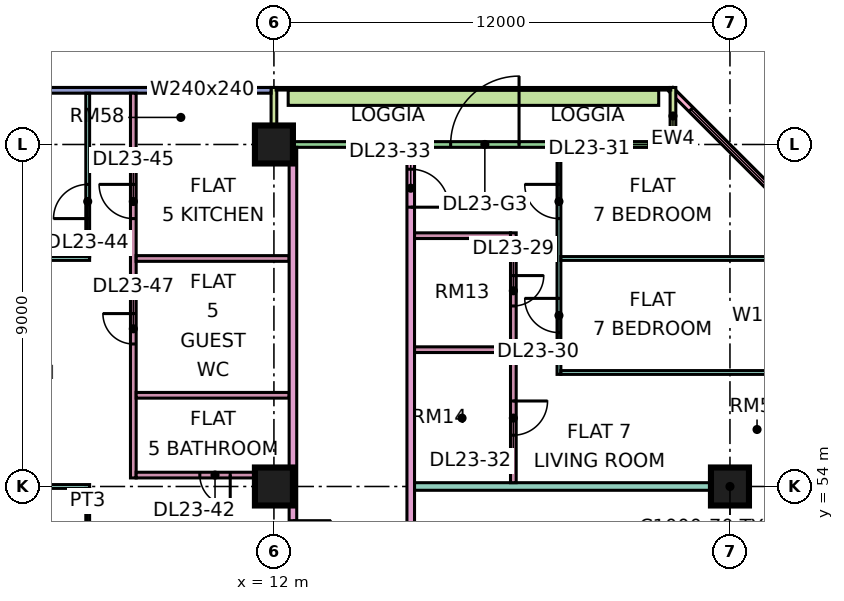
"""IFC4 building model, lengths in metres.
Left out: names, types, materials, properties, quantities, classifications, styles, units other than length and angle.
Written with IfcOpenShell. Run it as: python <this file> out.ifc"""

import sys

from ifc_helpers import new_model, si_unit, direction, frame, frame_2d, origin, origin_2d, place, context, subcontext, project, spatial, rectangle, extrude, element, fill, save


model = new_model("IFC4")
c1 = context("Model", 3, precision=1e-05, world=origin(), true_north=direction((0.0, 1.0)))
c2 = subcontext(c1, "Body", "Model", "MODEL_VIEW")
j1 = project(units=[si_unit("LENGTHUNIT", "METRE"), si_unit("PLANEANGLEUNIT", "RADIAN")], contexts=[c1])
p1 = place(None, origin())
s1 = spatial("IfcSite", under=j1, at=p1, CompositionType="ELEMENT")
p2 = place(p1, origin())
s2 = spatial("IfcBuilding", under=s1, at=p2, CompositionType="ELEMENT")
p3 = place(p2, frame((0.0, 0.0, 103.15)))
s3 = spatial("IfcBuildingStorey", under=s2, at=p3, CompositionType="ELEMENT", Elevation=103.15)
for number, where, z_axis, x_axis in (
    (1, (12.0, 54.0, 0.0), (0.0, 0.0, 1.0), (1.0, 0.0, 0.0)),
    (2, (12.0, 63.0, 0.0), (0.0, 0.0, 1.0), (1.0, 0.0, 0.0)),
    (3, (24.0, 54.0, 0.0), (0.0, 0.0, 1.0), (1.0, 0.0, 0.0)),
):
    element("IfcColumn", number, at=place(p3, frame(where, z_axis=z_axis, x_axis=x_axis)), inside=s3, PredefinedType="COLUMN", context=c2, shape_type="SweptSolid", body=[
        extrude(rectangle(XDim=1.0, YDim=1.0, at=origin_2d()), origin(), (0.0, 0.0, 1.0), 3.75),
    ])
p4 = place(p3, frame((25.447, 61.447, 0.0), z_axis=(0.0, 0.0, 1.0), x_axis=(-0.707106781187, 0.707106781187, 0.0)))
e4 = element("IfcWall", 4, at=p4, inside=s3, PredefinedType="SOLIDWALL", context=c2, shape_type="SweptSolid", body=[
    extrude(rectangle(XDim=4.243, YDim=0.15, at=frame_2d((2.121, 0.0))), origin(), (0.0, 0.0, 1.0), 3.35),
])
p5 = place(p4, frame((0.498, 0.0, 0.45)))
e5 = element("IfcOpeningElement", 5, at=p5, cuts=e4, PredefinedType="OPENING", context=c2, shape_type="SweptSolid", body=[
    extrude(rectangle(XDim=3.0, YDim=2.4, at=frame_2d((1.5, 1.2))), frame((0.0, 0.085, 0.0), z_axis=(0.0, -1.0, 0.0), x_axis=(1.0, 0.0, 0.0)), (0.0, 0.0, 1.0), 0.17),
])
p6 = place(p3, frame((22.425, 63.0, 0.0), z_axis=(0.0, 0.0, 1.0), x_axis=(-1.0, 0.0, 0.0)))
e6 = element("IfcWall", 6, at=p6, inside=s3, PredefinedType="SOLIDWALL", context=c2, shape_type="SweptSolid", body=[
    extrude(rectangle(XDim=10.35, YDim=0.15, at=frame_2d((5.175, 0.0))), origin(), (0.0, 0.0, 1.0), 3.35),
])
p7 = place(p6, frame((0.562, 0.0, 0.45)))
e7 = element("IfcOpeningElement", 7, at=p7, cuts=e6, PredefinedType="OPENING", context=c2, shape_type="SweptSolid", body=[
    extrude(rectangle(XDim=1.8, YDim=2.4, at=frame_2d((0.9, 1.2))), frame((0.0, 0.085, 0.0), z_axis=(0.0, -1.0, 0.0), x_axis=(1.0, 0.0, 0.0)), (0.0, 0.0, 1.0), 0.17),
])
p8 = place(p6, frame((3.975, 0.0, 0.0)))
e8 = element("IfcOpeningElement", 8, at=p8, cuts=e6, PredefinedType="OPENING", context=c2, shape_type="SweptSolid", body=[
    extrude(rectangle(XDim=1.8, YDim=2.4, at=frame_2d((0.9, 1.2))), frame((0.0, 0.085, 0.0), z_axis=(0.0, -1.0, 0.0), x_axis=(1.0, 0.0, 0.0)), (0.0, 0.0, 1.0), 0.17),
])
for number, where, z_axis, x_axis in (
    (9, (22.5, 64.5, 0.0), (0.0, 0.0, 1.0), (0.0, -1.0, 0.0)),
    (10, (12.0, 64.5, 0.0), (0.0, 0.0, 1.0), (0.0, -1.0, 0.0)),
):
    element("IfcWall", number, at=place(p3, frame(where, z_axis=z_axis, x_axis=x_axis)), inside=s3, PredefinedType="SOLIDWALL", context=c2, shape_type="SweptSolid", body=[
        extrude(rectangle(XDim=1.5, YDim=0.15, at=frame_2d((0.75, 0.0))), origin(), (0.0, 0.0, 1.0), 3.35),
    ])
p9 = place(p3, frame((11.925, 64.425, 0.0), z_axis=(0.0, 0.0, 1.0), x_axis=(-1.0, 0.0, 0.0)))
e11 = element("IfcWall", 11, at=p9, inside=s3, PredefinedType="SOLIDWALL", context=c2, shape_type="SweptSolid", body=[
    extrude(rectangle(XDim=10.425, YDim=0.15, at=frame_2d((5.212, 0.0))), origin(), (0.0, 0.0, 1.0), 3.35),
])
p10 = place(p9, frame((0.613, 0.0, 0.45)))
e12 = element("IfcOpeningElement", 12, at=p10, cuts=e11, PredefinedType="OPENING", context=c2, shape_type="SweptSolid", body=[
    extrude(rectangle(XDim=2.4, YDim=2.4, at=frame_2d((1.2, 1.2))), frame((0.0, 0.085, 0.0), z_axis=(0.0, -1.0, 0.0), x_axis=(1.0, 0.0, 0.0)), (0.0, 0.0, 1.0), 0.17),
])
p11 = place(p9, frame((6.125, 0.0, 0.45)))
e13 = element("IfcOpeningElement", 13, at=p11, cuts=e11, PredefinedType="OPENING", context=c2, shape_type="SweptSolid", body=[
    extrude(rectangle(XDim=3.0, YDim=2.4, at=frame_2d((1.5, 1.2))), frame((0.0, 0.085, 0.0), z_axis=(0.0, -1.0, 0.0), x_axis=(1.0, 0.0, 0.0)), (0.0, 0.0, 1.0), 0.17),
])
p12 = place(p3, frame((22.125, 64.229, 0.0), z_axis=(0.0, 0.0, 1.0), x_axis=(-1.0, 0.0, 0.0)))
e14 = element("IfcWall", 14, at=p12, inside=s3, PredefinedType="SOLIDWALL", context=c2, shape_type="SweptSolid", body=[
    extrude(rectangle(XDim=9.75, YDim=0.4, at=frame_2d((4.875, 0.0))), origin(), (0.0, 0.0, 1.0), 0.7),
])
p13 = place(p3, frame((0.0, 54.0, 0.0), z_axis=(0.0, 0.0, 1.0), x_axis=(1.0, 0.0, 0.0)))
e15 = element("IfcWall", 15, at=p13, inside=s3, PredefinedType="PARTITIONING", context=c2, shape_type="SweptSolid", body=[
    extrude(rectangle(XDim=7.15, YDim=0.1, at=frame_2d((3.575, 0.0))), origin(), (0.0, 0.0, 1.0), 3.35),
])
p14 = place(p3, frame((-1.35, 60.0, 0.0), z_axis=(0.0, 0.0, 1.0), x_axis=(1.0, 0.0, 0.0)))
e16 = element("IfcWall", 16, at=p14, inside=s3, PredefinedType="PARTITIONING", context=c2, shape_type="SweptSolid", body=[
    extrude(rectangle(XDim=8.5, YDim=0.1, at=frame_2d((4.25, 0.0))), origin(), (0.0, 0.0, 1.0), 3.35),
])
p15 = place(p3, frame((7.1, 51.1, 0.0), z_axis=(0.0, 0.0, 1.0), x_axis=(0.0, 1.0, 0.0)))
e17 = element("IfcWall", 17, at=p15, inside=s3, PredefinedType="PARTITIONING", context=c2, shape_type="SweptSolid", body=[
    extrude(rectangle(XDim=2.85, YDim=0.1, at=frame_2d((1.425, 0.0))), origin(), (0.0, 0.0, 1.0), 3.35),
])
p16 = place(p15, frame((0.95, 0.0, 0.0)))
e18 = element("IfcOpeningElement", 18, at=p16, cuts=e17, PredefinedType="OPENING", context=c2, shape_type="SweptSolid", body=[
    extrude(rectangle(XDim=0.9, YDim=2.1, at=frame_2d((0.45, 1.05))), frame((0.0, 0.06, 0.0), z_axis=(0.0, -1.0, 0.0), x_axis=(1.0, 0.0, 0.0)), (0.0, 0.0, 1.0), 0.12),
])
p17 = place(p3, frame((7.1, 60.05, 0.0), z_axis=(0.0, 0.0, 1.0), x_axis=(0.0, 1.0, 0.0)))
e19 = element("IfcWall", 19, at=p17, inside=s3, PredefinedType="PARTITIONING", context=c2, shape_type="SweptSolid", body=[
    extrude(rectangle(XDim=4.3, YDim=0.1, at=frame_2d((2.15, 0.0))), origin(), (0.0, 0.0, 1.0), 3.35),
])
p18 = place(p17, frame((1.0, 0.0, 0.0)))
e20 = element("IfcOpeningElement", 20, at=p18, cuts=e19, PredefinedType="OPENING", context=c2, shape_type="SweptSolid", body=[
    extrude(rectangle(XDim=0.9, YDim=2.1, at=frame_2d((0.45, 1.05))), frame((0.0, 0.06, 0.0), z_axis=(0.0, -1.0, 0.0), x_axis=(1.0, 0.0, 0.0)), (0.0, 0.0, 1.0), 0.12),
])
p19 = place(p3, frame((8.3, 54.225, 0.0), z_axis=(0.0, 0.0, 1.0), x_axis=(0.0, 1.0, 0.0)))
e21 = element("IfcWall", 21, at=p19, inside=s3, PredefinedType="PARTITIONING", context=c2, shape_type="SweptSolid", body=[
    extrude(rectangle(XDim=10.125, YDim=0.15, at=frame_2d((5.062, 0.0))), origin(), (0.0, 0.0, 1.0), 3.35),
])
p20 = place(p19, frame((6.825, 0.0, 0.0)))
e22 = element("IfcOpeningElement", 22, at=p20, cuts=e21, PredefinedType="OPENING", context=c2, shape_type="SweptSolid", body=[
    extrude(rectangle(XDim=0.9, YDim=2.1, at=frame_2d((0.45, 1.05))), frame((0.0, 0.085, 0.0), z_axis=(0.0, -1.0, 0.0), x_axis=(1.0, 0.0, 0.0)), (0.0, 0.0, 1.0), 0.17),
])
p21 = place(p19, frame((3.525, 0.0, 0.0)))
e23 = element("IfcOpeningElement", 23, at=p21, cuts=e21, PredefinedType="OPENING", context=c2, shape_type="SweptSolid", body=[
    extrude(rectangle(XDim=0.8, YDim=2.1, at=frame_2d((0.4, 1.05))), frame((0.0, 0.085, 0.0), z_axis=(0.0, -1.0, 0.0), x_axis=(1.0, 0.0, 0.0)), (0.0, 0.0, 1.0), 0.17),
])
p22 = place(p3, frame((8.375, 54.3, 0.0), z_axis=(0.0, 0.0, 1.0), x_axis=(1.0, 0.0, 0.0)))
e24 = element("IfcWall", 24, at=p22, inside=s3, PredefinedType="PARTITIONING", context=c2, shape_type="SweptSolid", body=[
    extrude(rectangle(XDim=4.025, YDim=0.15, at=frame_2d((2.012, 0.0))), origin(), (0.0, 0.0, 1.0), 3.35),
])
p23 = place(p22, frame((1.675, 0.0, 0.0)))
e25 = element("IfcOpeningElement", 25, at=p23, cuts=e24, PredefinedType="OPENING", context=c2, shape_type="SweptSolid", body=[
    extrude(rectangle(XDim=0.8, YDim=2.1, at=frame_2d((0.4, 1.05))), frame((0.0, 0.085, 0.0), z_axis=(0.0, -1.0, 0.0), x_axis=(1.0, 0.0, 0.0)), (0.0, 0.0, 1.0), 0.17),
])
for number, where, z_axis, x_axis in (
    (26, (8.375, 56.4, 0.0), (0.0, 0.0, 1.0), (1.0, 0.0, 0.0)),
    (27, (8.375, 60.0, 0.0), (0.0, 0.0, 1.0), (1.0, 0.0, 0.0)),
):
    element("IfcWall", number, at=place(p3, frame(where, z_axis=z_axis, x_axis=x_axis)), inside=s3, PredefinedType="PARTITIONING", context=c2, shape_type="SweptSolid", body=[
        extrude(rectangle(XDim=4.025, YDim=0.15, at=frame_2d((2.012, 0.0))), origin(), (0.0, 0.0, 1.0), 3.35),
    ])
p24 = place(p3, frame((12.5, 20.0, 0.0), z_axis=(0.0, 0.0, 1.0), x_axis=(0.0, 1.0, 0.0)))
e28 = element("IfcWall", 28, at=p24, inside=s3, PredefinedType="PARTITIONING", context=c2, shape_type="SweptSolid", body=[
    extrude(rectangle(XDim=42.926, YDim=0.2, at=frame_2d((21.463, 0.0))), origin(), (0.0, 0.0, 1.0), 3.35),
])
p25 = place(p24, frame((28.65, 0.0, 0.0)))
e29 = element("IfcOpeningElement", 29, at=p25, cuts=e28, PredefinedType="OPENING", context=c2, shape_type="SweptSolid", body=[
    extrude(rectangle(XDim=1.0, YDim=2.1, at=frame_2d((0.5, 1.05))), frame((0.0, 0.11, 0.0), z_axis=(0.0, -1.0, 0.0), x_axis=(1.0, 0.0, 0.0)), (0.0, 0.0, 1.0), 0.22),
])
p26 = place(p24, frame((32.1, 0.0, 0.0)))
e30 = element("IfcOpeningElement", 30, at=p26, cuts=e28, PredefinedType="OPENING", context=c2, shape_type="SweptSolid", body=[
    extrude(rectangle(XDim=1.0, YDim=2.1, at=frame_2d((0.5, 1.05))), frame((0.0, 0.11, 0.0), z_axis=(0.0, -1.0, 0.0), x_axis=(1.0, 0.0, 0.0)), (0.0, 0.0, 1.0), 0.22),
])
p27 = place(p24, frame((0.6, 0.0, 0.0)))
e31 = element("IfcOpeningElement", 31, at=p27, cuts=e28, PredefinedType="OPENING", context=c2, shape_type="SweptSolid", body=[
    extrude(rectangle(XDim=1.2, YDim=2.1, at=frame_2d((0.6, 1.05))), frame((0.0, 0.11, 0.0), z_axis=(0.0, -1.0, 0.0), x_axis=(1.0, 0.0, 0.0)), (0.0, 0.0, 1.0), 0.22),
])
p28 = place(p24, frame((13.95, 0.0, 0.0)))
e32 = element("IfcOpeningElement", 32, at=p28, cuts=e28, PredefinedType="OPENING", context=c2, shape_type="SweptSolid", body=[
    extrude(rectangle(XDim=1.0, YDim=2.1, at=frame_2d((0.5, 1.05))), frame((0.0, 0.11, 0.0), z_axis=(0.0, -1.0, 0.0), x_axis=(1.0, 0.0, 0.0)), (0.0, 0.0, 1.0), 0.22),
])
p29 = place(p3, frame((15.6, 51.225, 0.0), z_axis=(0.0, 0.0, 1.0), x_axis=(0.0, 1.0, 0.0)))
e33 = element("IfcWall", 33, at=p29, inside=s3, PredefinedType="PARTITIONING", context=c2, shape_type="SweptSolid", body=[
    extrude(rectangle(XDim=11.701, YDim=0.2, at=frame_2d((5.851, 0.0))), origin(), (0.0, 0.0, 1.0), 3.35),
])
p30 = place(p29, frame((10.125, 0.0, 0.0)))
e34 = element("IfcOpeningElement", 34, at=p30, cuts=e33, PredefinedType="OPENING", context=c2, shape_type="SweptSolid", body=[
    extrude(rectangle(XDim=1.0, YDim=2.1, at=frame_2d((0.5, 1.05))), frame((0.0, 0.11, 0.0), z_axis=(0.0, -1.0, 0.0), x_axis=(1.0, 0.0, 0.0)), (0.0, 0.0, 1.0), 0.22),
])
p31 = place(p3, frame((15.7, 54.0, 0.0), z_axis=(0.0, 0.0, 1.0), x_axis=(1.0, 0.0, 0.0)))
e35 = element("IfcWall", 35, at=p31, inside=s3, PredefinedType="PARTITIONING", context=c2, shape_type="SweptSolid", body=[
    extrude(rectangle(XDim=8.3, YDim=0.2, at=frame_2d((4.15, 0.0))), origin(), (0.0, 0.0, 1.0), 3.35),
])
for number, where, z_axis, x_axis in (
    (36, (15.7, 57.6, 0.0), (0.0, 0.0, 1.0), (1.0, 0.0, 0.0)),
    (37, (15.7, 60.6, 0.0), (0.0, 0.0, 1.0), (1.0, 0.0, 0.0)),
):
    element("IfcWall", number, at=place(p3, frame(where, z_axis=z_axis, x_axis=x_axis)), inside=s3, PredefinedType="PARTITIONING", context=c2, shape_type="SweptSolid", body=[
        extrude(rectangle(XDim=2.525, YDim=0.15, at=frame_2d((1.263, 0.0))), origin(), (0.0, 0.0, 1.0), 3.35),
    ])
p32 = place(p3, frame((18.3, 54.1, 0.0), z_axis=(0.0, 0.0, 1.0), x_axis=(0.0, 1.0, 0.0)))
e38 = element("IfcWall", 38, at=p32, inside=s3, PredefinedType="PARTITIONING", context=c2, shape_type="SweptSolid", body=[
    extrude(rectangle(XDim=6.575, YDim=0.15, at=frame_2d((3.288, 0.0))), origin(), (0.0, 0.0, 1.0), 3.35),
])
p33 = place(p32, frame((4.65, 0.0, 0.0)))
e39 = element("IfcOpeningElement", 39, at=p33, cuts=e38, PredefinedType="OPENING", context=c2, shape_type="SweptSolid", body=[
    extrude(rectangle(XDim=0.8, YDim=2.1, at=frame_2d((0.4, 1.05))), frame((0.0, 0.085, 0.0), z_axis=(0.0, -1.0, 0.0), x_axis=(1.0, 0.0, 0.0)), (0.0, 0.0, 1.0), 0.17),
])
p34 = place(p32, frame((1.25, 0.0, 0.0)))
e40 = element("IfcOpeningElement", 40, at=p34, cuts=e38, PredefinedType="OPENING", context=c2, shape_type="SweptSolid", body=[
    extrude(rectangle(XDim=0.9, YDim=2.1, at=frame_2d((0.45, 1.05))), frame((0.0, 0.085, 0.0), z_axis=(0.0, -1.0, 0.0), x_axis=(1.0, 0.0, 0.0)), (0.0, 0.0, 1.0), 0.17),
])
p35 = place(p3, frame((19.5, 56.95, 0.0), z_axis=(0.0, 0.0, 1.0), x_axis=(0.0, 1.0, 0.0)))
e41 = element("IfcWall", 41, at=p35, inside=s3, PredefinedType="PARTITIONING", context=c2, shape_type="SweptSolid", body=[
    extrude(rectangle(XDim=5.976, YDim=0.1, at=frame_2d((2.988, 0.0))), origin(), (0.0, 0.0, 1.0), 3.35),
])
p36 = place(p35, frame((1.1, 0.0, 0.0)))
e42 = element("IfcOpeningElement", 42, at=p36, cuts=e41, PredefinedType="OPENING", context=c2, shape_type="SweptSolid", body=[
    extrude(rectangle(XDim=0.9, YDim=2.1, at=frame_2d((0.45, 1.05))), frame((0.0, 0.06, 0.0), z_axis=(0.0, -1.0, 0.0), x_axis=(1.0, 0.0, 0.0)), (0.0, 0.0, 1.0), 0.12),
])
p37 = place(p35, frame((4.1, 0.0, 0.0)))
e43 = element("IfcOpeningElement", 43, at=p37, cuts=e41, PredefinedType="OPENING", context=c2, shape_type="SweptSolid", body=[
    extrude(rectangle(XDim=0.9, YDim=2.1, at=frame_2d((0.45, 1.05))), frame((0.0, 0.06, 0.0), z_axis=(0.0, -1.0, 0.0), x_axis=(1.0, 0.0, 0.0)), (0.0, 0.0, 1.0), 0.12),
])
p38 = place(p3, frame((19.55, 57.0, 0.0), z_axis=(0.0, 0.0, 1.0), x_axis=(1.0, 0.0, 0.0)))
e44 = element("IfcWall", 44, at=p38, inside=s3, PredefinedType="PARTITIONING", context=c2, shape_type="SweptSolid", body=[
    extrude(rectangle(XDim=5.8, YDim=0.1, at=frame_2d((2.9, 0.0))), origin(), (0.0, 0.0, 1.0), 3.35),
])
p39 = place(p3, frame((19.55, 60.0, 0.0), z_axis=(0.0, 0.0, 1.0), x_axis=(1.0, 0.0, 0.0)))
e45 = element("IfcWall", 45, at=p39, inside=s3, PredefinedType="PARTITIONING", context=c2, shape_type="SweptSolid", body=[
    extrude(rectangle(XDim=5.801, YDim=0.1, at=frame_2d((2.9, 0.0))), origin(), (0.0, 0.0, 1.0), 3.35),
])
p40 = place(p5, origin())
e46 = element("IfcWindow", 46, at=p40, inside=s3, PartitioningType="SINGLE_PANEL", PredefinedType="WINDOW", context=c2, shape_type="SweptSolid", body=[
    extrude(rectangle(XDim=3.0, YDim=2.4, at=frame_2d((1.5, 1.2))), frame((0.0, 0.03, 0.0), z_axis=(0.0, -1.0, 0.0), x_axis=(1.0, 0.0, 0.0)), (0.0, 0.0, 1.0), 0.06),
])
fill(e5, e46)
p41 = place(p7, origin())
e47 = element("IfcWindow", 47, at=p41, inside=s3, PartitioningType="SINGLE_PANEL", PredefinedType="WINDOW", context=c2, shape_type="SweptSolid", body=[
    extrude(rectangle(XDim=1.8, YDim=2.4, at=frame_2d((0.9, 1.2))), frame((0.0, 0.03, 0.0), z_axis=(0.0, -1.0, 0.0), x_axis=(1.0, 0.0, 0.0)), (0.0, 0.0, 1.0), 0.06),
])
fill(e7, e47)
p42 = place(p8, frame((1.8, 0.0, 0.0), z_axis=(0.0, 0.0, 1.0), x_axis=(-1.0, 0.0, 0.0)))
e48 = element("IfcDoor", 48, at=p42, inside=s3, OperationType="DOUBLE_DOOR_SINGLE_SWING", PredefinedType="DOOR", context=c2, shape_type="SweptSolid", body=[
    extrude(rectangle(XDim=1.8, YDim=2.4, at=frame_2d((0.9, 1.2))), frame((0.0, 0.025, 0.0), z_axis=(0.0, -1.0, 0.0), x_axis=(1.0, 0.0, 0.0)), (0.0, 0.0, 1.0), 0.05),
])
fill(e8, e48)
p43 = place(p10, origin())
e49 = element("IfcWindow", 49, at=p43, inside=s3, PartitioningType="SINGLE_PANEL", PredefinedType="WINDOW", context=c2, shape_type="SweptSolid", body=[
    extrude(rectangle(XDim=2.4, YDim=2.4, at=frame_2d((1.2, 1.2))), frame((0.0, 0.03, 0.0), z_axis=(0.0, -1.0, 0.0), x_axis=(1.0, 0.0, 0.0)), (0.0, 0.0, 1.0), 0.06),
])
fill(e12, e49)
p44 = place(p33, origin())
e50 = element("IfcDoor", 50, at=p44, inside=s3, OperationType="SINGLE_SWING_RIGHT", PredefinedType="DOOR", context=c2, shape_type="SweptSolid", body=[
    extrude(rectangle(XDim=0.8, YDim=2.1, at=frame_2d((0.4, 1.05))), frame((0.0, 0.025, 0.0), z_axis=(0.0, -1.0, 0.0), x_axis=(1.0, 0.0, 0.0)), (0.0, 0.0, 1.0), 0.05),
])
fill(e39, e50)
p45 = place(p36, frame((0.9, 0.0, 0.0), z_axis=(0.0, 0.0, 1.0), x_axis=(-1.0, 0.0, 0.0)))
e51 = element("IfcDoor", 51, at=p45, inside=s3, OperationType="SINGLE_SWING_RIGHT", PredefinedType="DOOR", context=c2, shape_type="SweptSolid", body=[
    extrude(rectangle(XDim=0.9, YDim=2.1, at=frame_2d((0.45, 1.05))), frame((0.0, 0.025, 0.0), z_axis=(0.0, -1.0, 0.0), x_axis=(1.0, 0.0, 0.0)), (0.0, 0.0, 1.0), 0.05),
])
fill(e42, e51)
p46 = place(p37, frame((0.9, 0.0, 0.0), z_axis=(0.0, 0.0, 1.0), x_axis=(-1.0, 0.0, 0.0)))
e52 = element("IfcDoor", 52, at=p46, inside=s3, OperationType="SINGLE_SWING_RIGHT", PredefinedType="DOOR", context=c2, shape_type="SweptSolid", body=[
    extrude(rectangle(XDim=0.9, YDim=2.1, at=frame_2d((0.45, 1.05))), frame((0.0, 0.025, 0.0), z_axis=(0.0, -1.0, 0.0), x_axis=(1.0, 0.0, 0.0)), (0.0, 0.0, 1.0), 0.05),
])
fill(e43, e52)
p47 = place(p34, origin())
e53 = element("IfcDoor", 53, at=p47, inside=s3, OperationType="SINGLE_SWING_RIGHT", PredefinedType="DOOR", context=c2, shape_type="SweptSolid", body=[
    extrude(rectangle(XDim=0.9, YDim=2.1, at=frame_2d((0.45, 1.05))), frame((0.0, 0.025, 0.0), z_axis=(0.0, -1.0, 0.0), x_axis=(1.0, 0.0, 0.0)), (0.0, 0.0, 1.0), 0.05),
])
fill(e40, e53)
p48 = place(p30, frame((1.0, 0.0, 0.0), z_axis=(0.0, 0.0, 1.0), x_axis=(-1.0, 0.0, 0.0)))
e54 = element("IfcDoor", 54, at=p48, inside=s3, OperationType="SINGLE_SWING_LEFT", PredefinedType="DOOR", context=c2, shape_type="SweptSolid", body=[
    extrude(rectangle(XDim=1.0, YDim=2.1, at=frame_2d((0.5, 1.05))), frame((0.0, 0.025, 0.0), z_axis=(0.0, -1.0, 0.0), x_axis=(1.0, 0.0, 0.0)), (0.0, 0.0, 1.0), 0.05),
])
fill(e34, e54)
p49 = place(p23, origin())
e55 = element("IfcDoor", 55, at=p49, inside=s3, OperationType="SINGLE_SWING_RIGHT", PredefinedType="DOOR", context=c2, shape_type="SweptSolid", body=[
    extrude(rectangle(XDim=0.8, YDim=2.1, at=frame_2d((0.4, 1.05))), frame((0.0, 0.025, 0.0), z_axis=(0.0, -1.0, 0.0), x_axis=(1.0, 0.0, 0.0)), (0.0, 0.0, 1.0), 0.05),
])
fill(e25, e55)
p50 = place(p18, origin())
e56 = element("IfcDoor", 56, at=p50, inside=s3, OperationType="SINGLE_SWING_LEFT", PredefinedType="DOOR", context=c2, shape_type="SweptSolid", body=[
    extrude(rectangle(XDim=0.9, YDim=2.1, at=frame_2d((0.45, 1.05))), frame((0.0, 0.025, 0.0), z_axis=(0.0, -1.0, 0.0), x_axis=(1.0, 0.0, 0.0)), (0.0, 0.0, 1.0), 0.05),
])
fill(e20, e56)
p51 = place(p20, frame((0.9, 0.0, 0.0), z_axis=(0.0, 0.0, 1.0), x_axis=(-1.0, 0.0, 0.0)))
e57 = element("IfcDoor", 57, at=p51, inside=s3, OperationType="SINGLE_SWING_RIGHT", PredefinedType="DOOR", context=c2, shape_type="SweptSolid", body=[
    extrude(rectangle(XDim=0.9, YDim=2.1, at=frame_2d((0.45, 1.05))), frame((0.0, 0.025, 0.0), z_axis=(0.0, -1.0, 0.0), x_axis=(1.0, 0.0, 0.0)), (0.0, 0.0, 1.0), 0.05),
])
fill(e22, e57)
p52 = place(p26, origin())
e58 = element("IfcDoor", 58, at=p52, inside=s3, OperationType="SINGLE_SWING_RIGHT", PredefinedType="DOOR", context=c2, shape_type="SweptSolid", body=[
    extrude(rectangle(XDim=1.0, YDim=2.1, at=frame_2d((0.5, 1.05))), frame((0.0, 0.025, 0.0), z_axis=(0.0, -1.0, 0.0), x_axis=(1.0, 0.0, 0.0)), (0.0, 0.0, 1.0), 0.05),
])
fill(e30, e58)
p53 = place(p21, frame((0.8, 0.0, 0.0), z_axis=(0.0, 0.0, 1.0), x_axis=(-1.0, 0.0, 0.0)))
e59 = element("IfcDoor", 59, at=p53, inside=s3, OperationType="SINGLE_SWING_RIGHT", PredefinedType="DOOR", context=c2, shape_type="SweptSolid", body=[
    extrude(rectangle(XDim=0.8, YDim=2.1, at=frame_2d((0.4, 1.05))), frame((0.0, 0.025, 0.0), z_axis=(0.0, -1.0, 0.0), x_axis=(1.0, 0.0, 0.0)), (0.0, 0.0, 1.0), 0.05),
])
fill(e23, e59)
save(model, sys.argv[1])
